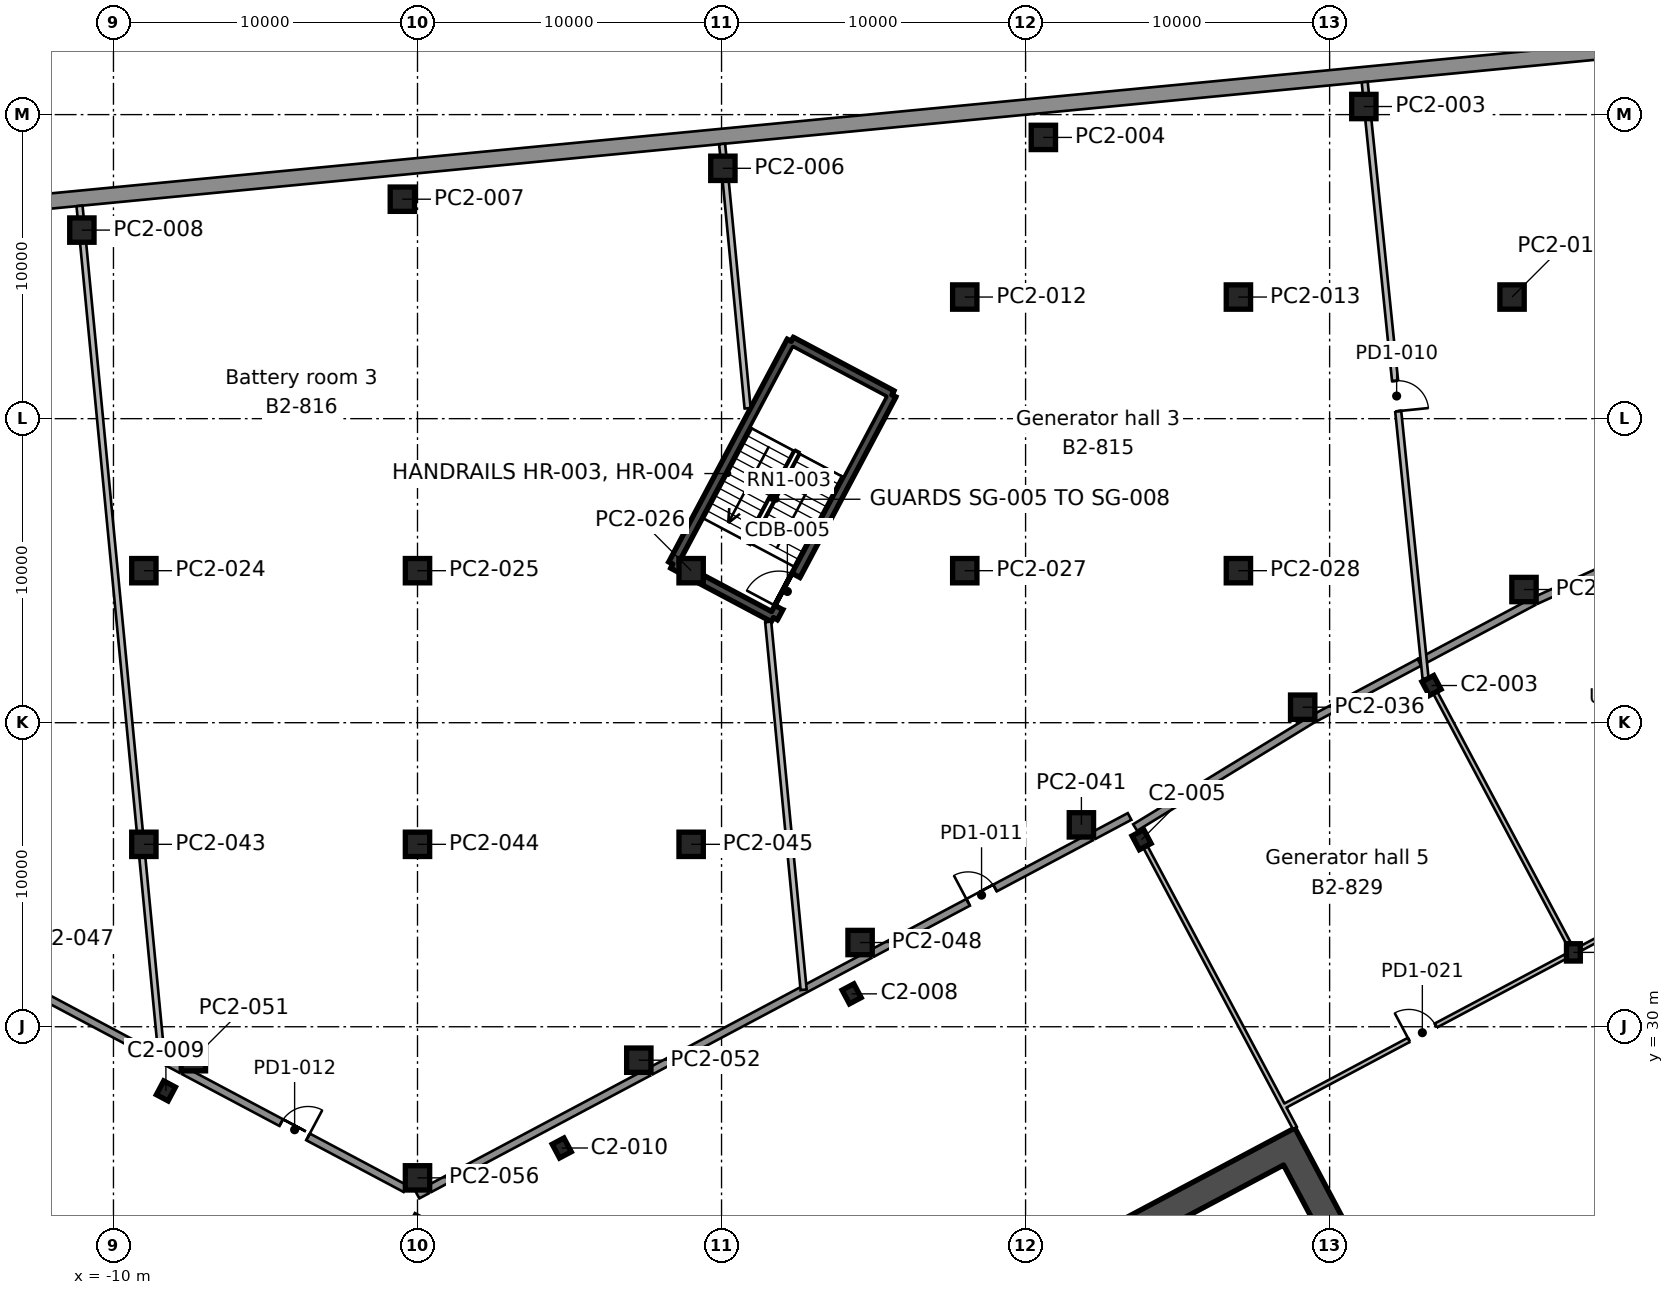
"""IFC4 building model, lengths in metres.
Left out: names, types, materials, properties, quantities, classifications, styles, units other than length and angle.
Written with IfcOpenShell. Run it as: python <this file> out.ifc"""

import sys

from ifc_helpers import new_model, si_unit, direction, frame, frame_2d, origin, origin_2d, place, context, subcontext, project, spatial, rectangle, i_section, extrude, element, fill, save


model = new_model("IFC4")
c1 = context("Model", 3, precision=1e-05, world=origin(), true_north=direction((0.0, 1.0)))
c2 = subcontext(c1, "Body", "Model", "MODEL_VIEW")
j1 = project(units=[si_unit("LENGTHUNIT", "METRE"), si_unit("PLANEANGLEUNIT", "RADIAN")], contexts=[c1])
p1 = place(None, origin())
s1 = spatial("IfcSite", under=j1, at=p1, CompositionType="ELEMENT")
p2 = place(p1, origin())
s2 = spatial("IfcBuilding", under=s1, at=p2, CompositionType="ELEMENT")
p3 = place(p2, frame((0.0, 0.0, -9.0)))
s3 = spatial("IfcBuildingStorey", under=s2, at=p3, CompositionType="ELEMENT", Elevation=-9.0)
for number, where, z_axis, x_axis in (
    (1, (4.744, 26.012, 0.0), (0.0, 0.0, 1.0), (-0.883, -0.469, 0.0)),
    (2, (-8.275, 27.89, 0.0), (0.0, 0.0, 1.0), (-0.883, 0.469, 0.0)),
    (3, (14.279, 31.082, 0.0), (0.0, 0.0, 1.0), (-0.883, -0.469, 0.0)),
):
    element("IfcColumn", number, at=place(p3, frame(where, z_axis=z_axis, x_axis=x_axis)), inside=s3, PredefinedType="COLUMN", context=c2, shape_type="SweptSolid", body=[
        extrude(i_section(OverallWidth=0.437, OverallDepth=0.513, WebThickness=0.061, FlangeThickness=0.097, FilletRadius=0.015, at=origin_2d()), origin(), (0.0, 0.0, 1.0), 4.5),
    ])
p4 = place(p3, frame((38.018, 32.446, 0.0), z_axis=(0.0, 0.0, 1.0), x_axis=(1.0, 0.0, 0.0)))
e4 = element("IfcColumn", 4, at=p4, inside=s3, PredefinedType="COLUMN", context=c2, shape_type="SweptSolid", body=[
    extrude(i_section(OverallWidth=0.455, OverallDepth=0.569, WebThickness=0.078, FlangeThickness=0.125, FilletRadius=0.015, at=origin_2d()), origin(), (0.0, 0.0, 1.0), 4.5),
])
for number, where, z_axis, x_axis in (
    (5, (23.815, 36.152, 0.0), (0.0, 0.0, 1.0), (-0.883, -0.469, 0.0)),
    (6, (33.351, 41.223, 0.0), (0.0, 0.0, 1.0), (-0.883, -0.469, 0.0)),
):
    element("IfcColumn", number, at=place(p3, frame(where, z_axis=z_axis, x_axis=x_axis)), inside=s3, PredefinedType="COLUMN", context=c2, shape_type="SweptSolid", body=[
        extrude(i_section(OverallWidth=0.437, OverallDepth=0.513, WebThickness=0.061, FlangeThickness=0.097, FilletRadius=0.015, at=origin_2d()), origin(), (0.0, 0.0, 1.0), 4.5),
    ])
p5 = place(p3, frame((37.849, 8.799, 0.0), z_axis=(0.0, 0.0, 1.0), x_axis=(-0.469465789982, 0.882950662289, 0.0)))
e7 = element("IfcWall", 7, at=p5, inside=s3, PredefinedType="SHEAR", context=c2, shape_type="SweptSolid", body=[
    extrude(rectangle(XDim=20.0, YDim=0.9, at=frame_2d((10.0, 0.0))), origin(), (0.0, 0.0, 1.0), 4.5),
])
p6 = place(p5, frame((10.6, 0.0, 0.0)))
e8 = element("IfcOpeningElement", 8, at=p6, cuts=e7, PredefinedType="OPENING", context=c2, shape_type="SweptSolid", body=[
    extrude(rectangle(XDim=2.4, YDim=2.4, at=frame_2d((1.2, 1.2))), frame((0.0, 0.46, 0.0), z_axis=(0.0, -1.0, 0.0), x_axis=(1.0, 0.0, 0.0)), (0.0, 0.0, 1.0), 0.92),
])
p7 = place(p3, frame((10.438, 16.366, 0.0), z_axis=(0.0, 0.0, 1.0), x_axis=(0.88294509198, 0.469476266226, 0.0)))
e9 = element("IfcWall", 9, at=p7, inside=s3, PredefinedType="SHEAR", context=c2, shape_type="SweptSolid", body=[
    extrude(rectangle(XDim=20.2, YDim=0.9, at=frame_2d((10.1, 0.0))), origin(), (0.0, 0.0, 1.0), 4.5),
])
p8 = place(p3, frame((12.293, 52.544, 0.0), z_axis=(0.0, 0.0, 1.0), x_axis=(0.882948761726, -0.46946936446, 0.0)))
e10 = element("IfcWall", 10, at=p8, inside=s3, PredefinedType="SHEAR", context=c2, shape_type="SweptSolid", body=[
    extrude(rectangle(XDim=3.75, YDim=0.3, at=frame_2d((1.875, 0.0))), origin(), (0.0, 0.0, 1.0), 4.5),
])
p9 = place(p3, frame((15.604, 50.784, 0.0), z_axis=(0.0, 0.0, 1.0), x_axis=(-0.469464178475, -0.882951519127, 0.0)))
e11 = element("IfcWall", 11, at=p9, inside=s3, PredefinedType="SHEAR", context=c2, shape_type="SweptSolid", body=[
    extrude(rectangle(XDim=8.3, YDim=0.3, at=frame_2d((4.15, 0.0))), origin(), (0.0, 0.0, 1.0), 4.5),
])
p10 = place(p9, frame((6.725, 0.0, 0.0)))
e12 = element("IfcOpeningElement", 12, at=p10, cuts=e11, PredefinedType="OPENING", context=c2, shape_type="SweptSolid", body=[
    extrude(rectangle(XDim=1.2, YDim=2.1, at=frame_2d((0.6, 1.05))), frame((0.0, 0.16, 0.0), z_axis=(0.0, -1.0, 0.0), x_axis=(1.0, 0.0, 0.0)), (0.0, 0.0, 1.0), 0.32),
])
p11 = place(p3, frame((11.707, 43.456, 0.0), z_axis=(0.0, 0.0, 1.0), x_axis=(-0.882948761726, 0.46946936446, 0.0)))
e13 = element("IfcWall", 13, at=p11, inside=s3, PredefinedType="SHEAR", context=c2, shape_type="SweptSolid", body=[
    extrude(rectangle(XDim=3.75, YDim=0.3, at=frame_2d((1.875, 0.0))), origin(), (0.0, 0.0, 1.0), 4.5),
])
p12 = place(p3, frame((8.396, 45.216, 0.0), z_axis=(0.0, 0.0, 1.0), x_axis=(0.469464178475, 0.882951519127, 0.0)))
e14 = element("IfcWall", 14, at=p12, inside=s3, PredefinedType="SHEAR", context=c2, shape_type="SweptSolid", body=[
    extrude(rectangle(XDim=8.3, YDim=0.3, at=frame_2d((4.15, 0.0))), origin(), (0.0, 0.0, 1.0), 4.5),
])
p13 = place(p3, frame((52.315, 63.363, 0.0), z_axis=(0.0, 0.0, 1.0), x_axis=(-0.995387233017, -0.095938815644, 0.0)))
e15 = element("IfcWall", 15, at=p13, inside=s3, PredefinedType="SOLIDWALL", context=c2, shape_type="SweptSolid", body=[
    extrude(rectangle(XDim=95.624, YDim=0.5, at=frame_2d((47.812, 0.0))), origin(), (0.0, 0.0, 1.0), 4.5),
])
for number, where, z_axis, x_axis in (
    (16, (0.0, 25.03, 0.0), (0.0, 0.0, 1.0), (1.0, 0.0, 0.0)),
    (17, (7.279, 28.9, 0.0), (0.0, 0.0, 1.0), (1.0, 0.0, 0.0)),
    (18, (-7.371, 28.949, 0.0), (0.0, 0.0, 1.0), (1.0, 0.0, 0.0)),
    (19, (14.557, 32.77, 0.0), (0.0, 0.0, 1.0), (1.0, 0.0, 0.0)),
    (20, (-9.0, 36.0, 0.0), (0.0, 0.0, 1.0), (1.0, 0.0, 0.0)),
    (21, (0.0, 36.0, 0.0), (0.0, 0.0, 1.0), (1.0, 0.0, 0.0)),
    (22, (9.0, 36.0, 0.0), (0.0, 0.0, 1.0), (1.0, 0.0, 0.0)),
    (23, (21.836, 36.64, 0.0), (0.0, 0.0, 1.0), (1.0, 0.0, 0.0)),
    (24, (29.114, 40.51, 0.0), (0.0, 0.0, 1.0), (1.0, 0.0, 0.0)),
    (25, (36.393, 44.38, 0.0), (0.0, 0.0, 1.0), (1.0, 0.0, 0.0)),
    (26, (-9.0, 45.0, 0.0), (0.0, 0.0, 1.0), (1.0, 0.0, 0.0)),
    (27, (0.0, 45.0, 0.0), (0.0, 0.0, 1.0), (1.0, 0.0, 0.0)),
    (28, (9.0, 45.0, 0.0), (0.0, 0.0, 1.0), (1.0, 0.0, 0.0)),
    (29, (18.0, 45.0, 0.0), (0.0, 0.0, 1.0), (1.0, 0.0, 0.0)),
    (30, (27.0, 45.0, 0.0), (0.0, 0.0, 1.0), (1.0, 0.0, 0.0)),
    (31, (18.0, 54.0, 0.0), (0.0, 0.0, 1.0), (1.0, 0.0, 0.0)),
    (32, (27.0, 54.0, 0.0), (0.0, 0.0, 1.0), (1.0, 0.0, 0.0)),
    (33, (36.0, 54.0, 0.0), (0.0, 0.0, 1.0), (1.0, 0.0, 0.0)),
    (34, (-11.039, 56.202, 0.0), (0.0, 0.0, 1.0), (1.0, 0.0, 0.0)),
    (35, (-0.498, 57.218, 0.0), (0.0, 0.0, 1.0), (1.0, 0.0, 0.0)),
    (36, (10.044, 58.234, 0.0), (0.0, 0.0, 1.0), (1.0, 0.0, 0.0)),
    (37, (20.585, 59.25, 0.0), (0.0, 0.0, 1.0), (1.0, 0.0, 0.0)),
    (38, (31.126, 60.266, 0.0), (0.0, 0.0, 1.0), (1.0, 0.0, 0.0)),
):
    element("IfcColumn", number, at=place(p3, frame(where, z_axis=z_axis, x_axis=x_axis)), inside=s3, PredefinedType="COLUMN", context=c2, shape_type="SweptSolid", body=[
        extrude(rectangle(XDim=0.8, YDim=0.8, at=origin_2d()), origin(), (0.0, 0.0, 1.0), 4.1),
    ])
p14 = place(p3, frame((31.155, 61.072, 0.0), z_axis=(0.0, 0.0, 1.0), x_axis=(0.095769432991, -0.995403544149, 0.0)))
e39 = element("IfcWall", 39, at=p14, inside=s3, PredefinedType="PARTITIONING", context=c2, shape_type="SweptSolid", body=[
    extrude(rectangle(XDim=0.408, YDim=0.2, at=frame_2d((0.204, 0.0))), origin(), (0.0, 0.0, 1.0), 4.1),
])
p15 = place(p3, frame((31.271, 59.866, 0.0), z_axis=(0.0, 0.0, 1.0), x_axis=(0.10182537806, -0.994802288087, 0.0)))
e40 = element("IfcWall", 40, at=p15, inside=s3, PredefinedType="PARTITIONING", context=c2, shape_type="SweptSolid", body=[
    extrude(rectangle(XDim=18.51, YDim=0.2, at=frame_2d((9.255, 0.0))), origin(), (0.0, 0.0, 1.0), 4.1),
])
p16 = place(p15, frame((8.669, 0.0, 0.0)))
e41 = element("IfcOpeningElement", 41, at=p16, cuts=e40, PredefinedType="OPENING", context=c2, shape_type="SweptSolid", body=[
    extrude(rectangle(XDim=1.0, YDim=2.1, at=frame_2d((0.5, 1.05))), frame((0.0, 0.11, 0.0), z_axis=(0.0, -1.0, 0.0), x_axis=(1.0, 0.0, 0.0)), (0.0, 0.0, 1.0), 0.22),
])
p17 = place(p3, frame((32.989, 42.004, 0.0), z_axis=(0.0, 0.0, 1.0), x_axis=(0.882952706143, 0.469461945971, 0.0)))
e42 = element("IfcWall", 42, at=p17, inside=s3, PredefinedType="SOLIDWALL", context=c2, shape_type="SweptSolid", body=[
    extrude(rectangle(XDim=4.209, YDim=0.25, at=frame_2d((2.104, 0.0))), origin(), (0.0, 0.0, 1.0), 4.1),
])
p18 = place(p3, frame((36.793, 44.027, 0.0), z_axis=(0.0, 0.0, 1.0), x_axis=(0.910758391685, 0.412939646892, 0.0)))
e43 = element("IfcWall", 43, at=p18, inside=s3, PredefinedType="SOLIDWALL", context=c2, shape_type="SweptSolid", body=[
    extrude(rectangle(XDim=6.457, YDim=0.25, at=frame_2d((3.229, 0.0))), origin(), (0.0, 0.0, 1.0), 4.1),
])
p19 = place(p3, frame((10.019, 59.035, 0.0), z_axis=(0.0, 0.0, 1.0), x_axis=(0.095781713328, -0.995402362561, 0.0)))
e44 = element("IfcWall", 44, at=p19, inside=s3, PredefinedType="PARTITIONING", context=c2, shape_type="SweptSolid", body=[
    extrude(rectangle(XDim=0.403, YDim=0.2, at=frame_2d((0.201, 0.0))), origin(), (0.0, 0.0, 1.0), 4.1),
])
p20 = place(p3, frame((10.135, 57.834, 0.0), z_axis=(0.0, 0.0, 1.0), x_axis=(0.095941692949, -0.995386955688, 0.0)))
e45 = element("IfcWall", 45, at=p20, inside=s3, PredefinedType="PARTITIONING", context=c2, shape_type="SweptSolid", body=[
    extrude(rectangle(XDim=7.527, YDim=0.2, at=frame_2d((3.764, 0.0))), origin(), (0.0, 0.0, 1.0), 4.1),
])
p21 = place(p3, frame((11.534, 43.315, 0.0), z_axis=(0.0, 0.0, 1.0), x_axis=(0.095933245663, -0.995387769855, 0.0)))
e46 = element("IfcWall", 46, at=p21, inside=s3, PredefinedType="PARTITIONING", context=c2, shape_type="SweptSolid", body=[
    extrude(rectangle(XDim=12.155, YDim=0.2, at=frame_2d((6.077, 0.0))), origin(), (0.0, 0.0, 1.0), 4.1),
])
p22 = place(p3, frame((23.603, 36.552, 0.0), z_axis=(0.0, 0.0, 1.0), x_axis=(0.853356100333, 0.521328462703, 0.0)))
e47 = element("IfcWall", 47, at=p22, inside=s3, PredefinedType="SOLIDWALL", context=c2, shape_type="SweptSolid", body=[
    extrude(rectangle(XDim=6.825, YDim=0.25, at=frame_2d((3.413, 0.0))), origin(), (0.0, 0.0, 1.0), 4.1),
])
p23 = place(p3, frame((29.514, 40.156, 0.0), z_axis=(0.0, 0.0, 1.0), x_axis=(0.882952549127, 0.469462241283, 0.0)))
e48 = element("IfcWall", 48, at=p23, inside=s3, PredefinedType="SOLIDWALL", context=c2, shape_type="SweptSolid", body=[
    extrude(rectangle(XDim=3.895, YDim=0.25, at=frame_2d((1.948, 0.0))), origin(), (0.0, 0.0, 1.0), 4.1),
])
p24 = place(p3, frame((12.706, 31.219, 0.0), z_axis=(0.0, 0.0, 1.0), x_axis=(0.882909290673, 0.469543591633, 0.0)))
e49 = element("IfcWall", 49, at=p24, inside=s3, PredefinedType="SOLIDWALL", context=c2, shape_type="SweptSolid", body=[
    extrude(rectangle(XDim=2.451, YDim=0.25, at=frame_2d((1.226, 0.0))), origin(), (0.0, 0.0, 1.0), 4.1),
])
p25 = place(p3, frame((14.957, 32.416, 0.0), z_axis=(0.0, 0.0, 1.0), x_axis=(0.882948003129, 0.46947079118, 0.0)))
e50 = element("IfcWall", 50, at=p25, inside=s3, PredefinedType="SOLIDWALL", context=c2, shape_type="SweptSolid", body=[
    extrude(rectangle(XDim=8.145, YDim=0.25, at=frame_2d((4.072, 0.0))), origin(), (0.0, 0.0, 1.0), 4.1),
])
p26 = place(p25, frame((3.572, 0.0, 0.0)))
e51 = element("IfcOpeningElement", 51, at=p26, cuts=e50, PredefinedType="OPENING", context=c2, shape_type="SweptSolid", body=[
    extrude(rectangle(XDim=1.0, YDim=2.1, at=frame_2d((0.5, 1.05))), frame((0.0, 0.135, 0.0), z_axis=(0.0, -1.0, 0.0), x_axis=(1.0, 0.0, 0.0)), (0.0, 0.0, 1.0), 0.27),
])
p27 = place(p3, frame((22.236, 36.287, 0.0), z_axis=(0.0, 0.0, 1.0), x_axis=(0.882931801402, 0.469501260993, 0.0)))
e52 = element("IfcWall", 52, at=p27, inside=s3, PredefinedType="SOLIDWALL", context=c2, shape_type="SweptSolid", body=[
    extrude(rectangle(XDim=1.341, YDim=0.25, at=frame_2d((0.67, 0.0))), origin(), (0.0, 0.0, 1.0), 4.1),
])
p28 = place(p3, frame((-11.116, 56.998, 0.0), z_axis=(0.0, 0.0, 1.0), x_axis=(0.095794311802, -0.995401150203, 0.0)))
e53 = element("IfcWall", 53, at=p28, inside=s3, PredefinedType="PARTITIONING", context=c2, shape_type="SweptSolid", body=[
    extrude(rectangle(XDim=0.397, YDim=0.2, at=frame_2d((0.199, 0.0))), origin(), (0.0, 0.0, 1.0), 4.1),
])
p29 = place(p3, frame((-11.001, 55.802, 0.0), z_axis=(0.0, 0.0, 1.0), x_axis=(0.095942712783, -0.99538685739, 0.0)))
e54 = element("IfcWall", 54, at=p29, inside=s3, PredefinedType="PARTITIONING", context=c2, shape_type="SweptSolid", body=[
    extrude(rectangle(XDim=19.492, YDim=0.2, at=frame_2d((9.746, 0.0))), origin(), (0.0, 0.0, 1.0), 4.1),
])
p30 = place(p3, frame((-9.054, 35.6, 0.0), z_axis=(0.0, 0.0, 1.0), x_axis=(0.095939612703, -0.995387156193, 0.0)))
e55 = element("IfcWall", 55, at=p30, inside=s3, PredefinedType="PARTITIONING", context=c2, shape_type="SweptSolid", body=[
    extrude(rectangle(XDim=6.695, YDim=0.2, at=frame_2d((3.348, 0.0))), origin(), (0.0, 0.0, 1.0), 4.1),
])
p31 = place(p3, frame((-8.407, 28.933, 0.0), z_axis=(0.0, 0.0, 1.0), x_axis=(0.88302789325, -0.469320508547, 0.0)))
e56 = element("IfcWall", 56, at=p31, inside=s3, PredefinedType="SOLIDWALL", context=c2, shape_type="SweptSolid", body=[
    extrude(rectangle(XDim=0.72, YDim=0.25, at=frame_2d((0.36, 0.0))), origin(), (0.0, 0.0, 1.0), 4.1),
])
p32 = place(p3, frame((-7.684, 28.549, 0.0), z_axis=(0.0, 0.0, 1.0), x_axis=(0.882947828207, -0.46947112016, 0.0)))
e57 = element("IfcWall", 57, at=p32, inside=s3, PredefinedType="SOLIDWALL", context=c2, shape_type="SweptSolid", body=[
    extrude(rectangle(XDim=8.249, YDim=0.25, at=frame_2d((4.125, 0.0))), origin(), (0.0, 0.0, 1.0), 4.1),
])
p33 = place(p32, frame((3.625, 0.0, 0.0)))
e58 = element("IfcOpeningElement", 58, at=p33, cuts=e57, PredefinedType="OPENING", context=c2, shape_type="SweptSolid", body=[
    extrude(rectangle(XDim=1.0, YDim=2.1, at=frame_2d((0.5, 1.05))), frame((0.0, 0.135, 0.0), z_axis=(0.0, -1.0, 0.0), x_axis=(1.0, 0.0, 0.0)), (0.0, 0.0, 1.0), 0.27),
])
p34 = place(p3, frame((0.0, 24.463, 0.0), z_axis=(0.0, 0.0, 1.0), x_axis=(0.882848088474, 0.469658655491, 0.0)))
e59 = element("IfcWall", 59, at=p34, inside=s3, PredefinedType="SOLIDWALL", context=c2, shape_type="SweptSolid", body=[
    extrude(rectangle(XDim=0.354, YDim=0.25, at=frame_2d((0.177, 0.0))), origin(), (0.0, 0.0, 1.0), 4.1),
])
p35 = place(p3, frame((0.4, 24.676, 0.0), z_axis=(0.0, 0.0, 1.0), x_axis=(0.882954609474, 0.469458366214, 0.0)))
e60 = element("IfcWall", 60, at=p35, inside=s3, PredefinedType="SOLIDWALL", context=c2, shape_type="SweptSolid", body=[
    extrude(rectangle(XDim=8.145, YDim=0.25, at=frame_2d((4.073, 0.0))), origin(), (0.0, 0.0, 1.0), 4.1),
])
p36 = place(p3, frame((7.679, 28.546, 0.0), z_axis=(0.0, 0.0, 1.0), x_axis=(0.882942382041, 0.469481362779, 0.0)))
e61 = element("IfcWall", 61, at=p36, inside=s3, PredefinedType="SOLIDWALL", context=c2, shape_type="SweptSolid", body=[
    extrude(rectangle(XDim=5.692, YDim=0.25, at=frame_2d((2.846, 0.0))), origin(), (0.0, 0.0, 1.0), 4.1),
])
p37 = place(p3, frame((-15.056, 32.469, 0.0), z_axis=(0.0, 0.0, 1.0), x_axis=(0.882954463929, -0.469458639954, 0.0)))
e62 = element("IfcWall", 62, at=p37, inside=s3, PredefinedType="SOLIDWALL", context=c2, shape_type="SweptSolid", body=[
    extrude(rectangle(XDim=7.53, YDim=0.25, at=frame_2d((3.765, 0.0))), origin(), (0.0, 0.0, 1.0), 4.1),
])
p38 = place(p3, frame((37.755, 32.307, 0.0), z_axis=(0.0, 0.0, 1.0), x_axis=(-0.882947426762, -0.469471875169, 0.0)))
e63 = element("IfcWall", 63, at=p38, inside=s3, PredefinedType="PARTITIONING", context=c2, shape_type="SweptSolid", body=[
    extrude(rectangle(XDim=10.503, YDim=0.15, at=frame_2d((5.251, 0.0))), origin(), (0.0, 0.0, 1.0), 4.1),
])
p39 = place(p38, frame((4.83, 0.0, 0.0)))
e64 = element("IfcOpeningElement", 64, at=p39, cuts=e63, PredefinedType="OPENING", context=c2, shape_type="SweptSolid", body=[
    extrude(rectangle(XDim=1.0, YDim=2.1, at=frame_2d((0.5, 1.05))), frame((0.0, 0.085, 0.0), z_axis=(0.0, -1.0, 0.0), x_axis=(1.0, 0.0, 0.0)), (0.0, 0.0, 1.0), 0.17),
])
p40 = place(p3, frame((47.291, 37.376, 0.0), z_axis=(0.0, 0.0, 1.0), x_axis=(-0.88295489766, -0.469457824194, 0.0)))
e65 = element("IfcWall", 65, at=p40, inside=s3, PredefinedType="PARTITIONING", context=c2, shape_type="SweptSolid", body=[
    extrude(rectangle(XDim=10.204, YDim=0.15, at=frame_2d((5.102, 0.0))), origin(), (0.0, 0.0, 1.0), 4.1),
])
p41 = place(p40, frame((4.602, 0.0, 0.0)))
e66 = element("IfcOpeningElement", 66, at=p41, cuts=e65, PredefinedType="OPENING", context=c2, shape_type="SweptSolid", body=[
    extrude(rectangle(XDim=1.0, YDim=2.1, at=frame_2d((0.5, 1.05))), frame((0.0, 0.085, 0.0), z_axis=(0.0, -1.0, 0.0), x_axis=(1.0, 0.0, 0.0)), (0.0, 0.0, 1.0), 0.17),
])
p42 = place(p3, frame((28.485, 27.371, 0.0), z_axis=(0.0, 0.0, 1.0), x_axis=(0.469454908155, -0.882956448082, 0.0)))
e67 = element("IfcWall", 67, at=p42, inside=s3, PredefinedType="PARTITIONING", context=c2, shape_type="SweptSolid", body=[
    extrude(rectangle(XDim=0.794, YDim=0.15, at=frame_2d((0.397, 0.0))), origin(), (0.0, 0.0, 1.0), 4.1),
])
p43 = place(p3, frame((37.85, 32.762, 0.0), z_axis=(0.0, 0.0, 1.0), x_axis=(-0.469481854544, 0.882942120557, 0.0)))
e68 = element("IfcWall", 68, at=p43, inside=s3, PredefinedType="PARTITIONING", context=c2, shape_type="SweptSolid", body=[
    extrude(rectangle(XDim=9.326, YDim=0.15, at=frame_2d((4.663, 0.0))), origin(), (0.0, 0.0, 1.0), 4.1),
])
p44 = place(p3, frame((23.936, 35.926, 0.0), z_axis=(0.0, 0.0, 1.0), x_axis=(0.469473365889, -0.882946634129, 0.0)))
e69 = element("IfcWall", 69, at=p44, inside=s3, PredefinedType="PARTITIONING", context=c2, shape_type="SweptSolid", body=[
    extrude(rectangle(XDim=9.687, YDim=0.15, at=frame_2d((4.844, 0.0))), origin(), (0.0, 0.0, 1.0), 4.1),
])
p45 = place(p10, frame((1.2, 0.0, 0.0), z_axis=(0.0, 0.0, 1.0), x_axis=(-1.0, 0.0, 0.0)))
e70 = element("IfcDoor", 70, at=p45, inside=s3, OperationType="SINGLE_SWING_LEFT", PredefinedType="DOOR", context=c2, shape_type="SweptSolid", body=[
    extrude(rectangle(XDim=1.2, YDim=2.1, at=frame_2d((0.6, 1.05))), frame((0.0, 0.025, 0.0), z_axis=(0.0, -1.0, 0.0), x_axis=(1.0, 0.0, 0.0)), (0.0, 0.0, 1.0), 0.05),
])
fill(e12, e70)
p46 = place(p39, frame((1.0, 0.0, 0.0), z_axis=(0.0, 0.0, 1.0), x_axis=(-1.0, 0.0, 0.0)))
e71 = element("IfcDoor", 71, at=p46, inside=s3, OperationType="SINGLE_SWING_LEFT", PredefinedType="DOOR", context=c2, shape_type="SweptSolid", body=[
    extrude(rectangle(XDim=1.0, YDim=2.1, at=frame_2d((0.5, 1.05))), frame((0.0, 0.025, 0.0), z_axis=(0.0, -1.0, 0.0), x_axis=(1.0, 0.0, 0.0)), (0.0, 0.0, 1.0), 0.05),
])
fill(e64, e71)
p47 = place(p33, origin())
e72 = element("IfcDoor", 72, at=p47, inside=s3, OperationType="SINGLE_SWING_RIGHT", PredefinedType="DOOR", context=c2, shape_type="SweptSolid", body=[
    extrude(rectangle(XDim=1.0, YDim=2.1, at=frame_2d((0.5, 1.05))), frame((0.0, 0.025, 0.0), z_axis=(0.0, -1.0, 0.0), x_axis=(1.0, 0.0, 0.0)), (0.0, 0.0, 1.0), 0.05),
])
fill(e58, e72)
p48 = place(p26, origin())
e73 = element("IfcDoor", 73, at=p48, inside=s3, OperationType="SINGLE_SWING_LEFT", PredefinedType="DOOR", context=c2, shape_type="SweptSolid", body=[
    extrude(rectangle(XDim=1.0, YDim=2.1, at=frame_2d((0.5, 1.05))), frame((0.0, 0.025, 0.0), z_axis=(0.0, -1.0, 0.0), x_axis=(1.0, 0.0, 0.0)), (0.0, 0.0, 1.0), 0.05),
])
fill(e51, e73)
p49 = place(p16, origin())
e74 = element("IfcDoor", 74, at=p49, inside=s3, OperationType="SINGLE_SWING_RIGHT", PredefinedType="DOOR", context=c2, shape_type="SweptSolid", body=[
    extrude(rectangle(XDim=1.0, YDim=2.1, at=frame_2d((0.5, 1.05))), frame((0.0, 0.025, 0.0), z_axis=(0.0, -1.0, 0.0), x_axis=(1.0, 0.0, 0.0)), (0.0, 0.0, 1.0), 0.05),
])
fill(e41, e74)
save(model, sys.argv[1])
